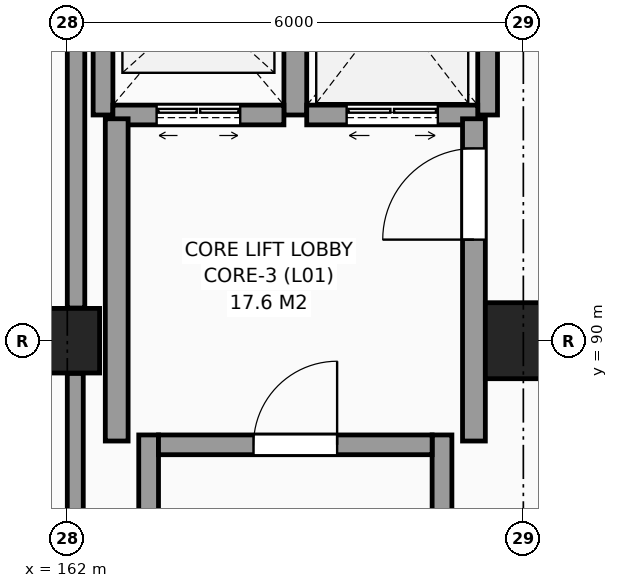
"""IFC4 building model, lengths in metres.
Left out: names, types, materials, properties, quantities, classifications, styles, units other than length and angle.
Written with IfcOpenShell. Run it as: python <this file> out.ifc"""

import sys

from ifc_helpers import new_model, si_unit, direction, frame, frame_2d, origin, origin_2d, place, context, subcontext, project, spatial, rectangle, circle, extrude, element, fill, save


model = new_model("IFC4")
c1 = context("Model", 3, precision=1e-05, world=origin(), true_north=direction((0.0, 1.0)))
c2 = subcontext(c1, "Body", "Model", "MODEL_VIEW")
j1 = project(units=[si_unit("LENGTHUNIT", "METRE"), si_unit("PLANEANGLEUNIT", "RADIAN")], contexts=[c1])
p1 = place(None, origin())
s1 = spatial("IfcSite", under=j1, at=p1, CompositionType="ELEMENT")
p2 = place(p1, origin())
s2 = spatial("IfcBuilding", under=s1, at=p2, CompositionType="ELEMENT")
p3 = place(p2, frame((0.0, 0.0, 6.0)))
s3 = spatial("IfcBuildingStorey", under=s2, at=p3, CompositionType="ELEMENT", Elevation=6.0)
p4 = place(p3, frame((162.0, 90.0, 0.0), z_axis=(0.0, 0.0, 1.0), x_axis=(1.0, 0.0, 0.0)))
e1 = element("IfcColumn", 1, at=p4, inside=s3, PredefinedType="COLUMN", context=c2, shape_type="SweptSolid", body=[
    extrude(circle(Radius=0.425, at=origin_2d()), origin(), (0.0, 0.0, 1.0), 4.5),
])
p5 = place(p3, frame((168.0, 90.0, 0.0), z_axis=(0.0, 0.0, 1.0), x_axis=(1.0, 0.0, 0.0)))
e2 = element("IfcColumn", 2, at=p5, inside=s3, PredefinedType="COLUMN", context=c2, shape_type="SweptSolid", body=[
    extrude(circle(Radius=0.5, at=origin_2d()), origin(), (0.0, 0.0, 1.0), 4.5),
])
p6 = place(p3, frame((162.115, 95.495, 0.0), z_axis=(0.0, 0.0, 1.0), x_axis=(0.0, -1.0, 0.0)))
e3 = element("IfcWall", 3, at=p6, inside=s3, PredefinedType="SOLIDWALL", context=c2, shape_type="SweptSolid", body=[
    extrude(rectangle(XDim=5.065, YDim=0.23, at=frame_2d((2.533, 0.0))), origin(), (0.0, 0.0, 1.0), 3.47),
])
p7 = place(p3, frame((162.105, 89.57, 0.0), z_axis=(0.0, 0.0, 1.0), x_axis=(0.0, -1.0, 0.0)))
e4 = element("IfcWall", 4, at=p7, inside=s3, PredefinedType="SOLIDWALL", context=c2, shape_type="SweptSolid", body=[
    extrude(rectangle(XDim=5.19, YDim=0.21, at=frame_2d((2.595, 0.0))), origin(), (0.0, 0.0, 1.0), 3.47),
])
for number, where, z_axis, x_axis in (
    (5, (163.07, 78.04, 0.0), (0.0, 0.0, 1.0), (0.0, 1.0, 0.0)),
    (6, (166.93, 78.04, 0.0), (0.0, 0.0, 1.0), (0.0, 1.0, 0.0)),
):
    element("IfcWall", number, at=place(p3, frame(where, z_axis=z_axis, x_axis=x_axis)), inside=s3, PredefinedType="SHEAR", context=c2, shape_type="SweptSolid", body=[
        extrude(rectangle(XDim=10.72, YDim=0.26, at=frame_2d((5.36, 0.0))), origin(), (0.0, 0.0, 1.0), 4.5),
    ])
p8 = place(p3, frame((163.2, 88.63, 0.0), z_axis=(0.0, 0.0, 1.0), x_axis=(1.0, 0.0, 0.0)))
e7 = element("IfcWall", 7, at=p8, inside=s3, PredefinedType="SHEAR", context=c2, shape_type="SweptSolid", body=[
    extrude(rectangle(XDim=3.6, YDim=0.26, at=frame_2d((1.8, 0.0))), origin(), (0.0, 0.0, 1.0), 4.5),
])
p9 = place(p8, frame((1.25, 0.0, 0.0)))
e8 = element("IfcOpeningElement", 8, at=p9, cuts=e7, PredefinedType="OPENING", context=c2, shape_type="SweptSolid", body=[
    extrude(rectangle(XDim=1.1, YDim=2.15, at=frame_2d((0.55, 1.075))), frame((0.0, 0.14, 0.0), z_axis=(0.0, -1.0, 0.0), x_axis=(1.0, 0.0, 0.0)), (0.0, 0.0, 1.0), 0.28),
])
p10 = place(p3, frame((162.47, 92.97, 0.0), z_axis=(0.0, 0.0, 1.0), x_axis=(0.0, 1.0, 0.0)))
e9 = element("IfcWall", 9, at=p10, inside=s3, PredefinedType="SHEAR", context=c2, shape_type="SweptSolid", body=[
    extrude(rectangle(XDim=2.91, YDim=0.26, at=frame_2d((1.455, 0.0))), origin(), (0.0, 0.0, 1.0), 4.5),
])
p11 = place(p3, frame((165.0, 92.97, 0.0), z_axis=(0.0, 0.0, 1.0), x_axis=(0.0, 1.0, 0.0)))
e10 = element("IfcWall", 10, at=p11, inside=s3, PredefinedType="SHEAR", context=c2, shape_type="SweptSolid", body=[
    extrude(rectangle(XDim=2.91, YDim=0.3, at=frame_2d((1.455, 0.0))), origin(), (0.0, 0.0, 1.0), 4.5),
])
p12 = place(p3, frame((162.6, 92.97, 0.0), z_axis=(0.0, 0.0, 1.0), x_axis=(1.0, 0.0, 0.0)))
e11 = element("IfcWall", 11, at=p12, inside=s3, PredefinedType="SHEAR", context=c2, shape_type="SweptSolid", body=[
    extrude(rectangle(XDim=2.25, YDim=0.26, at=frame_2d((1.125, 0.0))), origin(), (0.0, 0.0, 1.0), 4.5),
])
p13 = place(p12, frame((0.575, 0.0, 0.0)))
e12 = element("IfcOpeningElement", 12, at=p13, cuts=e11, PredefinedType="OPENING", context=c2, shape_type="SweptSolid", body=[
    extrude(rectangle(XDim=1.1, YDim=2.2, at=frame_2d((0.55, 1.1))), frame((0.0, 0.14, 0.0), z_axis=(0.0, -1.0, 0.0), x_axis=(1.0, 0.0, 0.0)), (0.0, 0.0, 1.0), 0.28),
])
p14 = place(p3, frame((167.53, 92.97, 0.0), z_axis=(0.0, 0.0, 1.0), x_axis=(0.0, 1.0, 0.0)))
e13 = element("IfcWall", 13, at=p14, inside=s3, PredefinedType="SHEAR", context=c2, shape_type="SweptSolid", body=[
    extrude(rectangle(XDim=2.91, YDim=0.26, at=frame_2d((1.455, 0.0))), origin(), (0.0, 0.0, 1.0), 4.5),
])
p15 = place(p3, frame((165.15, 92.97, 0.0), z_axis=(0.0, 0.0, 1.0), x_axis=(1.0, 0.0, 0.0)))
e14 = element("IfcWall", 14, at=p15, inside=s3, PredefinedType="SHEAR", context=c2, shape_type="SweptSolid", body=[
    extrude(rectangle(XDim=2.25, YDim=0.26, at=frame_2d((1.125, 0.0))), origin(), (0.0, 0.0, 1.0), 4.5),
])
p16 = place(p15, frame((0.525, 0.0, 0.0)))
e15 = element("IfcOpeningElement", 15, at=p16, cuts=e14, PredefinedType="OPENING", context=c2, shape_type="SweptSolid", body=[
    extrude(rectangle(XDim=1.2, YDim=2.25, at=frame_2d((0.6, 1.125))), frame((0.0, 0.14, 0.0), z_axis=(0.0, -1.0, 0.0), x_axis=(1.0, 0.0, 0.0)), (0.0, 0.0, 1.0), 0.28),
])
p17 = place(p3, frame((167.35, 88.68, 0.0), z_axis=(0.0, 0.0, 1.0), x_axis=(0.0, 1.0, 0.0)))
e16 = element("IfcWall", 16, at=p17, inside=s3, PredefinedType="SHEAR", context=c2, shape_type="SweptSolid", body=[
    extrude(rectangle(XDim=4.24, YDim=0.3, at=frame_2d((2.12, 0.0))), origin(), (0.0, 0.0, 1.0), 4.5),
])
p18 = place(p17, frame((2.65, 0.0, 0.0)))
e17 = element("IfcOpeningElement", 17, at=p18, cuts=e16, PredefinedType="OPENING", context=c2, shape_type="SweptSolid", body=[
    extrude(rectangle(XDim=1.2, YDim=2.2, at=frame_2d((0.6, 1.1))), frame((0.0, 0.16, 0.0), z_axis=(0.0, -1.0, 0.0), x_axis=(1.0, 0.0, 0.0)), (0.0, 0.0, 1.0), 0.32),
])
p19 = place(p3, frame((162.65, 88.68, 0.0), z_axis=(0.0, 0.0, 1.0), x_axis=(0.0, 1.0, 0.0)))
e18 = element("IfcWall", 18, at=p19, inside=s3, PredefinedType="SHEAR", context=c2, shape_type="SweptSolid", body=[
    extrude(rectangle(XDim=4.24, YDim=0.3, at=frame_2d((2.12, 0.0))), origin(), (0.0, 0.0, 1.0), 4.5),
])
p20 = place(p9, origin())
e19 = element("IfcDoor", 19, at=p20, inside=s3, OperationType="SINGLE_SWING_RIGHT", PredefinedType="DOOR", context=c2, shape_type="SweptSolid", body=[
    extrude(rectangle(XDim=1.1, YDim=2.15, at=frame_2d((0.55, 1.075))), frame((0.0, 0.025, 0.0), z_axis=(0.0, -1.0, 0.0), x_axis=(1.0, 0.0, 0.0)), (0.0, 0.0, 1.0), 0.05),
])
fill(e8, e19)
p21 = place(p13, origin())
e20 = element("IfcDoor", 20, at=p21, inside=s3, OperationType="DOUBLE_DOOR_SLIDING", PredefinedType="DOOR", context=c2, shape_type="SweptSolid", body=[
    extrude(rectangle(XDim=1.1, YDim=2.2, at=frame_2d((0.55, 1.1))), frame((0.0, 0.025, 0.0), z_axis=(0.0, -1.0, 0.0), x_axis=(1.0, 0.0, 0.0)), (0.0, 0.0, 1.0), 0.05),
])
fill(e12, e20)
p22 = place(p16, origin())
e21 = element("IfcDoor", 21, at=p22, inside=s3, OperationType="DOUBLE_DOOR_SLIDING", PredefinedType="DOOR", context=c2, shape_type="SweptSolid", body=[
    extrude(rectangle(XDim=1.2, YDim=2.25, at=frame_2d((0.6, 1.125))), frame((0.0, 0.025, 0.0), z_axis=(0.0, -1.0, 0.0), x_axis=(1.0, 0.0, 0.0)), (0.0, 0.0, 1.0), 0.05),
])
fill(e15, e21)
p23 = place(p18, origin())
e22 = element("IfcDoor", 22, at=p23, inside=s3, OperationType="SINGLE_SWING_LEFT", PredefinedType="DOOR", context=c2, shape_type="SweptSolid", body=[
    extrude(rectangle(XDim=1.2, YDim=2.2, at=frame_2d((0.6, 1.1))), frame((0.0, 0.025, 0.0), z_axis=(0.0, -1.0, 0.0), x_axis=(1.0, 0.0, 0.0)), (0.0, 0.0, 1.0), 0.05),
])
fill(e17, e22)
save(model, sys.argv[1])
